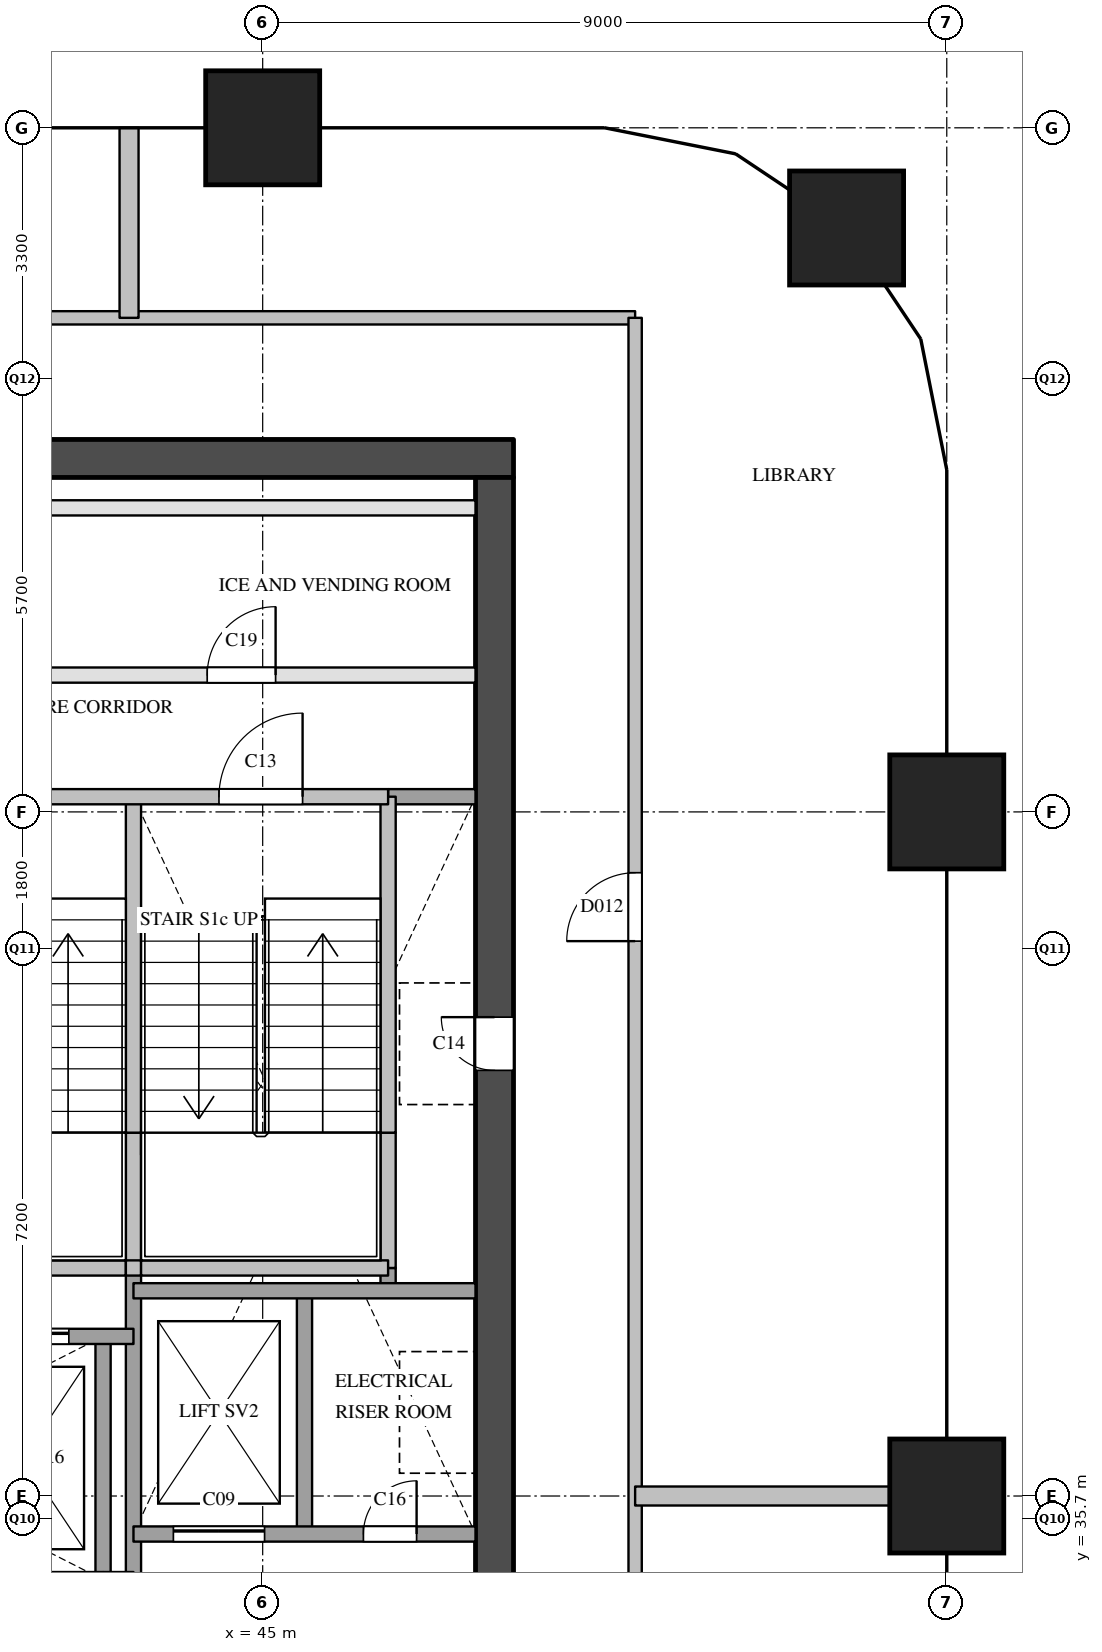
"""IFC4 building model, lengths in metres.
Left out: names, types, materials, properties, quantities, classifications, styles, units other than length and angle.
Written with IfcOpenShell. Run it as: python <this file> out.ifc"""

import sys

from ifc_helpers import new_model, si_unit, direction, frame, frame_2d, origin, origin_2d, place, context, subcontext, project, spatial, rectangle, extrude, element, fill, save


model = new_model("IFC4")
c1 = context("Model", 3, precision=1e-05, world=origin(), true_north=direction((0.0, 1.0)))
c2 = subcontext(c1, "Body", "Model", "MODEL_VIEW")
j1 = project(units=[si_unit("LENGTHUNIT", "METRE"), si_unit("PLANEANGLEUNIT", "RADIAN")], contexts=[c1])
p1 = place(None, origin())
s1 = spatial("IfcSite", under=j1, at=p1, CompositionType="ELEMENT")
p2 = place(p1, origin())
s2 = spatial("IfcBuilding", under=s1, at=p2, CompositionType="ELEMENT")
p3 = place(p2, frame((0.0, 0.0, 150.5)))
s3 = spatial("IfcBuildingStorey", under=s2, at=p3, CompositionType="ELEMENT", Elevation=150.5)
for number, where, z_axis, x_axis in (
    (1, (45.0, 54.0, 0.0), (0.0, 0.0, 1.0), (1.0, 0.0, 0.0)),
    (2, (54.0, 36.0, 0.0), (0.0, 0.0, 1.0), (1.0, 0.0, 0.0)),
    (3, (54.0, 45.0, 0.0), (0.0, 0.0, 1.0), (1.0, 0.0, 0.0)),
    (4, (52.682, 52.682, 0.0), (0.0, 0.0, 1.0), (1.0, 0.0, 0.0)),
):
    element("IfcColumn", number, at=place(p3, frame(where, z_axis=z_axis, x_axis=x_axis)), inside=s3, PredefinedType="COLUMN", context=c2, shape_type="SweptSolid", body=[
        extrude(rectangle(XDim=1.5, YDim=1.5, at=origin_2d()), origin(), (0.0, 0.0, 1.0), 3.9),
    ])
p4 = place(p3, frame((36.1, 49.65, 0.0), z_axis=(0.0, 0.0, 1.0), x_axis=(1.0, 0.0, 0.0)))
e5 = element("IfcWall", 5, at=p4, inside=s3, PredefinedType="SHEAR", context=c2, shape_type="SweptSolid", body=[
    extrude(rectangle(XDim=12.2, YDim=0.5, at=frame_2d((6.1, 0.0))), origin(), (0.0, 0.0, 1.0), 3.6),
])
p5 = place(p3, frame((48.05, 29.1, 0.0), z_axis=(0.0, 0.0, 1.0), x_axis=(0.0, 1.0, 0.0)))
e6 = element("IfcWall", 6, at=p5, inside=s3, PredefinedType="SHEAR", context=c2, shape_type="SweptSolid", body=[
    extrude(rectangle(XDim=20.3, YDim=0.5, at=frame_2d((10.15, 0.0))), origin(), (0.0, 0.0, 1.0), 3.6),
])
p6 = place(p5, frame((12.5, 0.0, 0.0)))
e7 = element("IfcOpeningElement", 7, at=p6, cuts=e6, PredefinedType="OPENING", context=c2, shape_type="SweptSolid", body=[
    extrude(rectangle(XDim=0.7, YDim=2.1, at=frame_2d((0.35, 1.05))), frame((0.0, 0.26, 0.0), z_axis=(0.0, -1.0, 0.0), x_axis=(1.0, 0.0, 0.0)), (0.0, 0.0, 1.0), 0.52),
])
p7 = place(p5, frame((3.9, 0.0, 0.0)))
e8 = element("IfcOpeningElement", 8, at=p7, cuts=e6, PredefinedType="OPENING", context=c2, shape_type="SweptSolid", body=[
    extrude(rectangle(XDim=1.8, YDim=2.1, at=frame_2d((0.9, 1.05))), frame((0.0, 0.26, 0.0), z_axis=(0.0, -1.0, 0.0), x_axis=(1.0, 0.0, 0.0)), (0.0, 0.0, 1.0), 0.52),
])
p8 = place(p3, frame((42.9, 34.9, 0.0), z_axis=(0.0, 0.0, 1.0), x_axis=(0.0, 1.0, 0.0)))
e9 = element("IfcWall", 9, at=p8, inside=s3, PredefinedType="SOLIDWALL", context=c2, shape_type="SweptSolid", body=[
    extrude(rectangle(XDim=3.2, YDim=0.2, at=frame_2d((1.6, 0.0))), origin(), (0.0, 0.0, 1.0), 3.6),
])
p9 = place(p3, frame((43.3, 29.1, 0.0), z_axis=(0.0, 0.0, 1.0), x_axis=(0.0, 1.0, 0.0)))
e10 = element("IfcWall", 10, at=p9, inside=s3, PredefinedType="SOLIDWALL", context=c2, shape_type="SweptSolid", body=[
    extrude(rectangle(XDim=9.9, YDim=0.2, at=frame_2d((4.95, 0.0))), origin(), (0.0, 0.0, 1.0), 3.6),
])
p10 = place(p3, frame((43.3, 39.0, 0.0), z_axis=(0.0, 0.0, 1.0), x_axis=(0.0, 1.0, 0.0)))
e11 = element("IfcWall", 11, at=p10, inside=s3, PredefinedType="SOLIDWALL", context=c2, shape_type="SweptSolid", body=[
    extrude(rectangle(XDim=1.78, YDim=0.2, at=frame_2d((0.89, 0.0))), origin(), (0.0, 0.0, 1.0), 3.6),
])
p11 = place(p3, frame((43.3, 40.78, 0.0), z_axis=(0.0, 0.0, 1.0), x_axis=(0.0, 1.0, 0.0)))
e12 = element("IfcWall", 12, at=p11, inside=s3, PredefinedType="SOLIDWALL", context=c2, shape_type="SweptSolid", body=[
    extrude(rectangle(XDim=4.42, YDim=0.2, at=frame_2d((2.21, 0.0))), origin(), (0.0, 0.0, 1.0), 3.6),
])
p12 = place(p3, frame((45.55, 35.5, 0.0), z_axis=(0.0, 0.0, 1.0), x_axis=(0.0, 1.0, 0.0)))
e13 = element("IfcWall", 13, at=p12, inside=s3, PredefinedType="SOLIDWALL", context=c2, shape_type="SweptSolid", body=[
    extrude(rectangle(XDim=3.2, YDim=0.2, at=frame_2d((1.6, 0.0))), origin(), (0.0, 0.0, 1.0), 3.6),
])
p13 = place(p3, frame((46.65, 38.7, 0.0), z_axis=(0.0, 0.0, 1.0), x_axis=(0.0, 1.0, 0.0)))
e14 = element("IfcWall", 14, at=p13, inside=s3, PredefinedType="SOLIDWALL", context=c2, shape_type="SweptSolid", body=[
    extrude(rectangle(XDim=0.3, YDim=0.2, at=frame_2d((0.15, 0.0))), origin(), (0.0, 0.0, 1.0), 3.6),
])
p14 = place(p3, frame((46.65, 39.0, 0.0), z_axis=(0.0, 0.0, 1.0), x_axis=(0.0, 1.0, 0.0)))
e15 = element("IfcWall", 15, at=p14, inside=s3, PredefinedType="SOLIDWALL", context=c2, shape_type="SweptSolid", body=[
    extrude(rectangle(XDim=1.78, YDim=0.2, at=frame_2d((0.89, 0.0))), origin(), (0.0, 0.0, 1.0), 3.6),
])
p15 = place(p3, frame((46.65, 40.78, 0.0), z_axis=(0.0, 0.0, 1.0), x_axis=(0.0, 1.0, 0.0)))
e16 = element("IfcWall", 16, at=p15, inside=s3, PredefinedType="SOLIDWALL", context=c2, shape_type="SweptSolid", body=[
    extrude(rectangle(XDim=4.42, YDim=0.2, at=frame_2d((2.21, 0.0))), origin(), (0.0, 0.0, 1.0), 3.6),
])
p16 = place(p3, frame((43.3, 35.5, 0.0), z_axis=(0.0, 0.0, 1.0), x_axis=(1.0, 0.0, 0.0)))
e17 = element("IfcWall", 17, at=p16, inside=s3, PredefinedType="SOLIDWALL", context=c2, shape_type="SweptSolid", body=[
    extrude(rectangle(XDim=4.5, YDim=0.2, at=frame_2d((2.25, 0.0))), origin(), (0.0, 0.0, 1.0), 3.6),
])
p17 = place(p16, frame((0.525, 0.0, 0.0)))
e18 = element("IfcOpeningElement", 18, at=p17, cuts=e17, PredefinedType="OPENING", context=c2, shape_type="SweptSolid", body=[
    extrude(rectangle(XDim=1.2, YDim=2.1, at=frame_2d((0.6, 1.05))), frame((0.0, 0.11, 0.0), z_axis=(0.0, -1.0, 0.0), x_axis=(1.0, 0.0, 0.0)), (0.0, 0.0, 1.0), 0.22),
])
p18 = place(p16, frame((3.025, 0.0, 0.0)))
e19 = element("IfcOpeningElement", 19, at=p18, cuts=e17, PredefinedType="OPENING", context=c2, shape_type="SweptSolid", body=[
    extrude(rectangle(XDim=0.7, YDim=2.1, at=frame_2d((0.35, 1.05))), frame((0.0, 0.11, 0.0), z_axis=(0.0, -1.0, 0.0), x_axis=(1.0, 0.0, 0.0)), (0.0, 0.0, 1.0), 0.22),
])
p19 = place(p3, frame((36.6, 38.1, 0.0), z_axis=(0.0, 0.0, 1.0), x_axis=(1.0, 0.0, 0.0)))
e20 = element("IfcWall", 20, at=p19, inside=s3, PredefinedType="SOLIDWALL", context=c2, shape_type="SweptSolid", body=[
    extrude(rectangle(XDim=6.7, YDim=0.2, at=frame_2d((3.35, 0.0))), origin(), (0.0, 0.0, 1.0), 3.6),
])
p20 = place(p19, frame((0.45, 0.0, 0.0)))
e21 = element("IfcOpeningElement", 21, at=p20, cuts=e20, PredefinedType="OPENING", context=c2, shape_type="SweptSolid", body=[
    extrude(rectangle(XDim=1.2, YDim=2.1, at=frame_2d((0.6, 1.05))), frame((0.0, 0.11, 0.0), z_axis=(0.0, -1.0, 0.0), x_axis=(1.0, 0.0, 0.0)), (0.0, 0.0, 1.0), 0.22),
])
p21 = place(p19, frame((2.55, 0.0, 0.0)))
e22 = element("IfcOpeningElement", 22, at=p21, cuts=e20, PredefinedType="OPENING", context=c2, shape_type="SweptSolid", body=[
    extrude(rectangle(XDim=1.2, YDim=2.1, at=frame_2d((0.6, 1.05))), frame((0.0, 0.11, 0.0), z_axis=(0.0, -1.0, 0.0), x_axis=(1.0, 0.0, 0.0)), (0.0, 0.0, 1.0), 0.22),
])
p22 = place(p19, frame((4.65, 0.0, 0.0)))
e23 = element("IfcOpeningElement", 23, at=p22, cuts=e20, PredefinedType="OPENING", context=c2, shape_type="SweptSolid", body=[
    extrude(rectangle(XDim=1.2, YDim=2.1, at=frame_2d((0.6, 1.05))), frame((0.0, 0.11, 0.0), z_axis=(0.0, -1.0, 0.0), x_axis=(1.0, 0.0, 0.0)), (0.0, 0.0, 1.0), 0.22),
])
p23 = place(p3, frame((43.3, 38.7, 0.0), z_axis=(0.0, 0.0, 1.0), x_axis=(1.0, 0.0, 0.0)))
e24 = element("IfcWall", 24, at=p23, inside=s3, PredefinedType="SOLIDWALL", context=c2, shape_type="SweptSolid", body=[
    extrude(rectangle(XDim=4.5, YDim=0.2, at=frame_2d((2.25, 0.0))), origin(), (0.0, 0.0, 1.0), 3.6),
])
p24 = place(p3, frame((40.05, 39.0, 0.0), z_axis=(0.0, 0.0, 1.0), x_axis=(1.0, 0.0, 0.0)))
e25 = element("IfcWall", 25, at=p24, inside=s3, PredefinedType="SOLIDWALL", context=c2, shape_type="SweptSolid", body=[
    extrude(rectangle(XDim=3.15, YDim=0.2, at=frame_2d((1.575, 0.0))), origin(), (0.0, 0.0, 1.0), 3.6),
])
p25 = place(p3, frame((43.2, 39.0, 0.0), z_axis=(0.0, 0.0, 1.0), x_axis=(1.0, 0.0, 0.0)))
e26 = element("IfcWall", 26, at=p25, inside=s3, PredefinedType="SOLIDWALL", context=c2, shape_type="SweptSolid", body=[
    extrude(rectangle(XDim=0.2, YDim=0.2, at=frame_2d((0.1, 0.0))), origin(), (0.0, 0.0, 1.0), 3.6),
])
p26 = place(p3, frame((43.4, 39.0, 0.0), z_axis=(0.0, 0.0, 1.0), x_axis=(1.0, 0.0, 0.0)))
e27 = element("IfcWall", 27, at=p26, inside=s3, PredefinedType="SOLIDWALL", context=c2, shape_type="SweptSolid", body=[
    extrude(rectangle(XDim=3.25, YDim=0.2, at=frame_2d((1.625, 0.0))), origin(), (0.0, 0.0, 1.0), 3.6),
])
p27 = place(p3, frame((46.65, 45.2, 0.0), z_axis=(0.0, 0.0, 1.0), x_axis=(1.0, 0.0, 0.0)))
e28 = element("IfcWall", 28, at=p27, inside=s3, PredefinedType="SOLIDWALL", context=c2, shape_type="SweptSolid", body=[
    extrude(rectangle(XDim=1.15, YDim=0.2, at=frame_2d((0.575, 0.0))), origin(), (0.0, 0.0, 1.0), 3.6),
])
p28 = place(p3, frame((36.6, 45.2, 0.0), z_axis=(0.0, 0.0, 1.0), x_axis=(1.0, 0.0, 0.0)))
e29 = element("IfcWall", 29, at=p28, inside=s3, PredefinedType="SOLIDWALL", context=c2, shape_type="SweptSolid", body=[
    extrude(rectangle(XDim=10.05, YDim=0.2, at=frame_2d((5.025, 0.0))), origin(), (0.0, 0.0, 1.0), 3.6),
])
p29 = place(p28, frame((1.125, 0.0, 0.0)))
e30 = element("IfcOpeningElement", 30, at=p29, cuts=e29, PredefinedType="OPENING", context=c2, shape_type="SweptSolid", body=[
    extrude(rectangle(XDim=1.1, YDim=2.1, at=frame_2d((0.55, 1.05))), frame((0.0, 0.11, 0.0), z_axis=(0.0, -1.0, 0.0), x_axis=(1.0, 0.0, 0.0)), (0.0, 0.0, 1.0), 0.22),
])
p30 = place(p28, frame((4.475, 0.0, 0.0)))
e31 = element("IfcOpeningElement", 31, at=p30, cuts=e29, PredefinedType="OPENING", context=c2, shape_type="SweptSolid", body=[
    extrude(rectangle(XDim=1.1, YDim=2.1, at=frame_2d((0.55, 1.05))), frame((0.0, 0.11, 0.0), z_axis=(0.0, -1.0, 0.0), x_axis=(1.0, 0.0, 0.0)), (0.0, 0.0, 1.0), 0.22),
])
p31 = place(p28, frame((7.825, 0.0, 0.0)))
e32 = element("IfcOpeningElement", 32, at=p31, cuts=e29, PredefinedType="OPENING", context=c2, shape_type="SweptSolid", body=[
    extrude(rectangle(XDim=1.1, YDim=2.1, at=frame_2d((0.55, 1.05))), frame((0.0, 0.11, 0.0), z_axis=(0.0, -1.0, 0.0), x_axis=(1.0, 0.0, 0.0)), (0.0, 0.0, 1.0), 0.22),
])
p32 = place(p3, frame((36.6, 46.8, 0.0), z_axis=(0.0, 0.0, 1.0), x_axis=(1.0, 0.0, 0.0)))
e33 = element("IfcWall", 33, at=p32, inside=s3, PredefinedType="PARTITIONING", context=c2, shape_type="SweptSolid", body=[
    extrude(rectangle(XDim=11.2, YDim=0.2, at=frame_2d((5.6, 0.0))), origin(), (0.0, 0.0, 1.0), 3.6),
])
p33 = place(p32, frame((2.07, 0.0, 0.0)))
e34 = element("IfcOpeningElement", 34, at=p33, cuts=e33, PredefinedType="OPENING", context=c2, shape_type="SweptSolid", body=[
    extrude(rectangle(XDim=0.9, YDim=2.1, at=frame_2d((0.45, 1.05))), frame((0.0, 0.11, 0.0), z_axis=(0.0, -1.0, 0.0), x_axis=(1.0, 0.0, 0.0)), (0.0, 0.0, 1.0), 0.22),
])
p34 = place(p32, frame((7.67, 0.0, 0.0)))
e35 = element("IfcOpeningElement", 35, at=p34, cuts=e33, PredefinedType="OPENING", context=c2, shape_type="SweptSolid", body=[
    extrude(rectangle(XDim=0.9, YDim=2.1, at=frame_2d((0.45, 1.05))), frame((0.0, 0.11, 0.0), z_axis=(0.0, -1.0, 0.0), x_axis=(1.0, 0.0, 0.0)), (0.0, 0.0, 1.0), 0.22),
])
p35 = place(p3, frame((36.6, 49.0, 0.0), z_axis=(0.0, 0.0, 1.0), x_axis=(1.0, 0.0, 0.0)))
e36 = element("IfcWall", 36, at=p35, inside=s3, PredefinedType="PARTITIONING", context=c2, shape_type="SweptSolid", body=[
    extrude(rectangle(XDim=11.2, YDim=0.2, at=frame_2d((5.6, 0.0))), origin(), (0.0, 0.0, 1.0), 3.6),
])
p36 = place(p3, frame((34.5, 51.5, 0.0), z_axis=(0.0, 0.0, 1.0), x_axis=(1.0, 0.0, 0.0)))
e37 = element("IfcWall", 37, at=p36, inside=s3, PredefinedType="PARTITIONING", context=c2, shape_type="SweptSolid", body=[
    extrude(rectangle(XDim=15.4, YDim=0.175, at=frame_2d((7.7, 0.0))), origin(), (0.0, 0.0, 1.0), 3.6),
])
p37 = place(p3, frame((49.9, 28.5, 0.0), z_axis=(0.0, 0.0, 1.0), x_axis=(0.0, 1.0, 0.0)))
e38 = element("IfcWall", 38, at=p37, inside=s3, PredefinedType="PARTITIONING", context=c2, shape_type="SweptSolid", body=[
    extrude(rectangle(XDim=23.0, YDim=0.175, at=frame_2d((11.5, 0.0))), origin(), (0.0, 0.0, 1.0), 3.6),
])
p38 = place(p37, frame((3.3, 0.0, 0.0)))
e39 = element("IfcOpeningElement", 39, at=p38, cuts=e38, PredefinedType="OPENING", context=c2, shape_type="SweptSolid", body=[
    extrude(rectangle(XDim=0.9, YDim=2.1, at=frame_2d((0.45, 1.05))), frame((0.0, 0.097, 0.0), z_axis=(0.0, -1.0, 0.0), x_axis=(1.0, 0.0, 0.0)), (0.0, 0.0, 1.0), 0.195),
])
p39 = place(p37, frame((14.8, 0.0, 0.0)))
e40 = element("IfcOpeningElement", 40, at=p39, cuts=e38, PredefinedType="OPENING", context=c2, shape_type="SweptSolid", body=[
    extrude(rectangle(XDim=0.9, YDim=2.1, at=frame_2d((0.45, 1.05))), frame((0.0, 0.097, 0.0), z_axis=(0.0, -1.0, 0.0), x_axis=(1.0, 0.0, 0.0)), (0.0, 0.0, 1.0), 0.195),
])
p40 = place(p3, frame((49.9, 36.0, 0.0), z_axis=(0.0, 0.0, 1.0), x_axis=(1.0, 0.0, 0.0)))
e41 = element("IfcWall", 41, at=p40, inside=s3, PredefinedType="PARTITIONING", context=c2, shape_type="SweptSolid", body=[
    extrude(rectangle(XDim=4.1, YDim=0.25, at=frame_2d((2.05, 0.0))), origin(), (0.0, 0.0, 1.0), 3.6),
])
p41 = place(p3, frame((43.242, 51.5, 0.0), z_axis=(0.0, 0.0, 1.0), x_axis=(0.0, 1.0, 0.0)))
e42 = element("IfcWall", 42, at=p41, inside=s3, PredefinedType="PARTITIONING", context=c2, shape_type="SweptSolid", body=[
    extrude(rectangle(XDim=2.5, YDim=0.25, at=frame_2d((1.25, 0.0))), origin(), (0.0, 0.0, 1.0), 2.6),
])
p42 = place(p22, origin())
e43 = element("IfcDoor", 43, at=p42, inside=s3, OperationType="SLIDING_TO_LEFT", PredefinedType="DOOR", context=c2, shape_type="SweptSolid", body=[
    extrude(rectangle(XDim=1.2, YDim=2.1, at=frame_2d((0.6, 1.05))), frame((0.0, 0.025, 0.0), z_axis=(0.0, -1.0, 0.0), x_axis=(1.0, 0.0, 0.0)), (0.0, 0.0, 1.0), 0.05),
])
fill(e23, e43)
p43 = place(p17, origin())
e44 = element("IfcDoor", 44, at=p43, inside=s3, OperationType="SLIDING_TO_LEFT", PredefinedType="DOOR", context=c2, shape_type="SweptSolid", body=[
    extrude(rectangle(XDim=1.2, YDim=2.1, at=frame_2d((0.6, 1.05))), frame((0.0, 0.025, 0.0), z_axis=(0.0, -1.0, 0.0), x_axis=(1.0, 0.0, 0.0)), (0.0, 0.0, 1.0), 0.05),
])
fill(e18, e44)
p44 = place(p31, origin())
e45 = element("IfcDoor", 45, at=p44, inside=s3, OperationType="SINGLE_SWING_RIGHT", PredefinedType="DOOR", context=c2, shape_type="SweptSolid", body=[
    extrude(rectangle(XDim=1.1, YDim=2.1, at=frame_2d((0.55, 1.05))), frame((0.0, 0.025, 0.0), z_axis=(0.0, -1.0, 0.0), x_axis=(1.0, 0.0, 0.0)), (0.0, 0.0, 1.0), 0.05),
])
fill(e32, e45)
p45 = place(p6, origin())
e46 = element("IfcDoor", 46, at=p45, inside=s3, OperationType="SINGLE_SWING_RIGHT", PredefinedType="DOOR", context=c2, shape_type="SweptSolid", body=[
    extrude(rectangle(XDim=0.7, YDim=2.1, at=frame_2d((0.35, 1.05))), frame((0.0, 0.025, 0.0), z_axis=(0.0, -1.0, 0.0), x_axis=(1.0, 0.0, 0.0)), (0.0, 0.0, 1.0), 0.05),
])
fill(e7, e46)
p46 = place(p18, origin())
e47 = element("IfcDoor", 47, at=p46, inside=s3, OperationType="SINGLE_SWING_RIGHT", PredefinedType="DOOR", context=c2, shape_type="SweptSolid", body=[
    extrude(rectangle(XDim=0.7, YDim=2.1, at=frame_2d((0.35, 1.05))), frame((0.0, 0.025, 0.0), z_axis=(0.0, -1.0, 0.0), x_axis=(1.0, 0.0, 0.0)), (0.0, 0.0, 1.0), 0.05),
])
fill(e19, e47)
p47 = place(p34, origin())
e48 = element("IfcDoor", 48, at=p47, inside=s3, OperationType="SINGLE_SWING_RIGHT", PredefinedType="DOOR", context=c2, shape_type="SweptSolid", body=[
    extrude(rectangle(XDim=0.9, YDim=2.1, at=frame_2d((0.45, 1.05))), frame((0.0, 0.025, 0.0), z_axis=(0.0, -1.0, 0.0), x_axis=(1.0, 0.0, 0.0)), (0.0, 0.0, 1.0), 0.05),
])
fill(e35, e48)
p48 = place(p39, origin())
e49 = element("IfcDoor", 49, at=p48, inside=s3, OperationType="SINGLE_SWING_LEFT", PredefinedType="DOOR", context=c2, shape_type="SweptSolid", body=[
    extrude(rectangle(XDim=0.9, YDim=2.1, at=frame_2d((0.45, 1.05))), frame((0.0, 0.025, 0.0), z_axis=(0.0, -1.0, 0.0), x_axis=(1.0, 0.0, 0.0)), (0.0, 0.0, 1.0), 0.05),
])
fill(e40, e49)
save(model, sys.argv[1])
